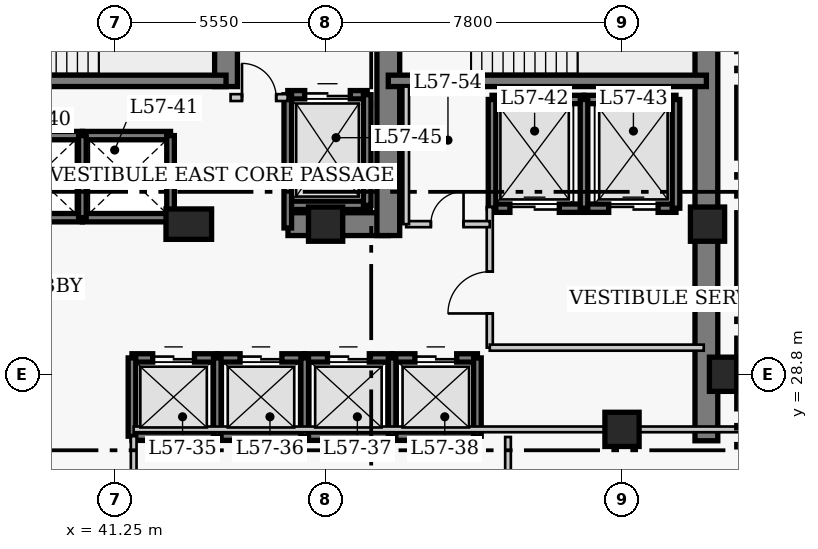
"""IFC4 building model, lengths in metres.
Left out: names, types, materials, properties, quantities, classifications, styles, units other than length and angle.
Written with IfcOpenShell. Run it as: python <this file> out.ifc"""

import sys

from ifc_helpers import new_model, si_unit, direction, frame, frame_2d, origin, origin_2d, place, context, subcontext, project, spatial, rectangle, extrude, element, fill, save


model = new_model("IFC4")
c1 = context("Model", 3, precision=1e-05, world=origin(), true_north=direction((0.0, 1.0)))
c2 = subcontext(c1, "Body", "Model", "MODEL_VIEW")
j1 = project(units=[si_unit("LENGTHUNIT", "METRE"), si_unit("PLANEANGLEUNIT", "RADIAN")], contexts=[c1])
p1 = place(None, origin())
s1 = spatial("IfcSite", under=j1, at=p1, CompositionType="ELEMENT")
p2 = place(p1, origin())
s2 = spatial("IfcBuilding", under=s1, at=p2, CompositionType="ELEMENT")
p3 = place(p2, frame((0.0, 0.0, 228.0)))
s3 = spatial("IfcBuildingStorey", under=s2, at=p3, CompositionType="ELEMENT", Elevation=228.0)
p4 = place(p3, frame((56.82, 27.05, 0.0), z_axis=(0.0, 0.0, 1.0), x_axis=(0.0, 1.0, 0.0)))
e1 = element("IfcWall", 1, at=p4, inside=s3, PredefinedType="SHEAR", context=c2, shape_type="SweptSolid", body=[
    extrude(rectangle(XDim=13.57, YDim=0.6, at=frame_2d((6.785, 0.0))), origin(), (0.0, 0.0, 1.0), 3.9),
])
p5 = place(p3, frame((45.81, 32.75, 0.0), z_axis=(0.0, 0.0, 1.0), x_axis=(1.0, 0.0, 0.0)))
e2 = element("IfcWall", 2, at=p5, inside=s3, PredefinedType="SHEAR", context=c2, shape_type="SweptSolid", body=[
    extrude(rectangle(XDim=2.64, YDim=0.6, at=frame_2d((1.32, 0.0))), origin(), (0.0, 0.0, 1.0), 3.9),
])
p6 = place(p3, frame((44.18, 36.37, 0.0), z_axis=(0.0, 0.0, 1.0), x_axis=(0.0, 1.0, 0.0)))
e3 = element("IfcWall", 3, at=p6, inside=s3, PredefinedType="SHEAR", context=c2, shape_type="SweptSolid", body=[
    extrude(rectangle(XDim=3.95, YDim=0.6, at=frame_2d((1.975, 0.0))), origin(), (0.0, 0.0, 1.0), 3.9),
])
p7 = place(p3, frame((48.45, 32.45, 0.0), z_axis=(0.0, 0.0, 1.0), x_axis=(0.0, 1.0, 0.0)))
e4 = element("IfcWall", 4, at=p7, inside=s3, PredefinedType="SHEAR", context=c2, shape_type="SweptSolid", body=[
    extrude(rectangle(XDim=7.87, YDim=0.6, at=frame_2d((3.935, 0.0))), origin(), (0.0, 0.0, 1.0), 3.9),
])
p8 = place(p7, frame((5.75, 0.0, 0.0)))
e5 = element("IfcOpeningElement", 5, at=p8, cuts=e4, PredefinedType="OPENING", context=c2, shape_type="SweptSolid", body=[
    extrude(rectangle(XDim=1.1, YDim=2.15, at=frame_2d((0.55, 1.075))), frame((0.0, 0.31, 0.0), z_axis=(0.0, -1.0, 0.0), x_axis=(1.0, 0.0, 0.0)), (0.0, 0.0, 1.0), 0.62),
])
p9 = place(p3, frame((35.85, 36.52, 0.0), z_axis=(0.0, 0.0, 1.0), x_axis=(1.0, 0.0, 0.0)))
e6 = element("IfcWall", 6, at=p9, inside=s3, PredefinedType="SHEAR", context=c2, shape_type="SweptSolid", body=[
    extrude(rectangle(XDim=8.33, YDim=0.3, at=frame_2d((4.165, 0.0))), origin(), (0.0, 0.0, 1.0), 3.9),
])
p10 = place(p3, frame((48.45, 36.52, 0.0), z_axis=(0.0, 0.0, 1.0), x_axis=(1.0, 0.0, 0.0)))
e7 = element("IfcWall", 7, at=p10, inside=s3, PredefinedType="SHEAR", context=c2, shape_type="SweptSolid", body=[
    extrude(rectangle(XDim=8.37, YDim=0.3, at=frame_2d((4.185, 0.0))), origin(), (0.0, 0.0, 1.0), 3.9),
])
p11 = place(p3, frame((57.35, 28.8, 0.0), z_axis=(0.0, 0.0, 1.0), x_axis=(1.0, 0.0, 0.0)))
e8 = element("IfcColumn", 8, at=p11, inside=s3, PredefinedType="COLUMN", context=c2, shape_type="SweptSolid", body=[
    extrude(rectangle(XDim=0.9, YDim=0.9, at=origin_2d()), origin(), (0.0, 0.0, 1.0), 3.9),
])
p12 = place(p3, frame((43.2, 32.75, 0.0), z_axis=(0.0, 0.0, 1.0), x_axis=(1.0, 0.0, 0.0)))
e9 = element("IfcColumn", 9, at=p12, inside=s3, PredefinedType="COLUMN", context=c2, shape_type="SweptSolid", body=[
    extrude(rectangle(XDim=1.2, YDim=0.8, at=origin_2d()), origin(), (0.0, 0.0, 1.0), 3.9),
])
for number, where, z_axis, x_axis in (
    (10, (46.8, 32.75, 0.0), (0.0, 0.0, 1.0), (1.0, 0.0, 0.0)),
    (11, (54.6, 27.35, 0.0), (0.0, 0.0, 1.0), (1.0, 0.0, 0.0)),
    (12, (56.85, 32.75, 0.0), (0.0, 0.0, 1.0), (1.0, 0.0, 0.0)),
):
    element("IfcColumn", number, at=place(p3, frame(where, z_axis=z_axis, x_axis=x_axis)), inside=s3, PredefinedType="COLUMN", context=c2, shape_type="SweptSolid", body=[
        extrude(rectangle(XDim=0.9, YDim=0.9, at=origin_2d()), origin(), (0.0, 0.0, 1.0), 3.9),
    ])
p13 = place(p3, frame((41.705, 29.23, 0.0), z_axis=(0.0, 0.0, 1.0), x_axis=(1.0, 0.0, 0.0)))
e13 = element("IfcWall", 13, at=p13, inside=s3, PredefinedType="SHEAR", context=c2, shape_type="SweptSolid", body=[
    extrude(rectangle(XDim=2.245, YDim=0.22, at=frame_2d((1.123, 0.0))), origin(), (0.0, 0.0, 1.0), 3.9),
])
p14 = place(p13, frame((0.545, 0.0, 0.0)))
e14 = element("IfcOpeningElement", 14, at=p14, cuts=e13, PredefinedType="OPENING", context=c2, shape_type="SweptSolid", body=[
    extrude(rectangle(XDim=1.1, YDim=2.15, at=frame_2d((0.55, 1.075))), frame((0.0, 0.12, 0.0), z_axis=(0.0, -1.0, 0.0), x_axis=(1.0, 0.0, 0.0)), (0.0, 0.0, 1.0), 0.24),
])
p15 = place(p3, frame((41.705, 27.17, 0.0), z_axis=(0.0, 0.0, 1.0), x_axis=(1.0, 0.0, 0.0)))
e15 = element("IfcWall", 15, at=p15, inside=s3, PredefinedType="SHEAR", context=c2, shape_type="SweptSolid", body=[
    extrude(rectangle(XDim=2.245, YDim=0.22, at=frame_2d((1.123, 0.0))), origin(), (0.0, 0.0, 1.0), 3.9),
])
p16 = place(p3, frame((41.705, 27.17, 0.0), z_axis=(0.0, 0.0, 1.0), x_axis=(0.0, 1.0, 0.0)))
e16 = element("IfcWall", 16, at=p16, inside=s3, PredefinedType="SHEAR", context=c2, shape_type="SweptSolid", body=[
    extrude(rectangle(XDim=2.06, YDim=0.2, at=frame_2d((1.03, 0.0))), origin(), (0.0, 0.0, 1.0), 3.9),
])
p17 = place(p3, frame((43.95, 29.23, 0.0), z_axis=(0.0, 0.0, 1.0), x_axis=(1.0, 0.0, 0.0)))
e17 = element("IfcWall", 17, at=p17, inside=s3, PredefinedType="SHEAR", context=c2, shape_type="SweptSolid", body=[
    extrude(rectangle(XDim=2.3, YDim=0.22, at=frame_2d((1.15, 0.0))), origin(), (0.0, 0.0, 1.0), 3.9),
])
p18 = place(p17, frame((0.6, 0.0, 0.0)))
e18 = element("IfcOpeningElement", 18, at=p18, cuts=e17, PredefinedType="OPENING", context=c2, shape_type="SweptSolid", body=[
    extrude(rectangle(XDim=1.1, YDim=2.15, at=frame_2d((0.55, 1.075))), frame((0.0, 0.12, 0.0), z_axis=(0.0, -1.0, 0.0), x_axis=(1.0, 0.0, 0.0)), (0.0, 0.0, 1.0), 0.24),
])
p19 = place(p3, frame((43.95, 27.17, 0.0), z_axis=(0.0, 0.0, 1.0), x_axis=(1.0, 0.0, 0.0)))
e19 = element("IfcWall", 19, at=p19, inside=s3, PredefinedType="SHEAR", context=c2, shape_type="SweptSolid", body=[
    extrude(rectangle(XDim=2.3, YDim=0.22, at=frame_2d((1.15, 0.0))), origin(), (0.0, 0.0, 1.0), 3.9),
])
p20 = place(p3, frame((43.95, 27.17, 0.0), z_axis=(0.0, 0.0, 1.0), x_axis=(0.0, 1.0, 0.0)))
e20 = element("IfcWall", 20, at=p20, inside=s3, PredefinedType="SHEAR", context=c2, shape_type="SweptSolid", body=[
    extrude(rectangle(XDim=2.06, YDim=0.2, at=frame_2d((1.03, 0.0))), origin(), (0.0, 0.0, 1.0), 3.9),
])
p21 = place(p3, frame((46.25, 29.23, 0.0), z_axis=(0.0, 0.0, 1.0), x_axis=(1.0, 0.0, 0.0)))
e21 = element("IfcWall", 21, at=p21, inside=s3, PredefinedType="SHEAR", context=c2, shape_type="SweptSolid", body=[
    extrude(rectangle(XDim=2.3, YDim=0.22, at=frame_2d((1.15, 0.0))), origin(), (0.0, 0.0, 1.0), 3.9),
])
p22 = place(p21, frame((0.6, 0.0, 0.0)))
e22 = element("IfcOpeningElement", 22, at=p22, cuts=e21, PredefinedType="OPENING", context=c2, shape_type="SweptSolid", body=[
    extrude(rectangle(XDim=1.1, YDim=2.15, at=frame_2d((0.55, 1.075))), frame((0.0, 0.12, 0.0), z_axis=(0.0, -1.0, 0.0), x_axis=(1.0, 0.0, 0.0)), (0.0, 0.0, 1.0), 0.24),
])
p23 = place(p3, frame((46.25, 27.17, 0.0), z_axis=(0.0, 0.0, 1.0), x_axis=(1.0, 0.0, 0.0)))
e23 = element("IfcWall", 23, at=p23, inside=s3, PredefinedType="SHEAR", context=c2, shape_type="SweptSolid", body=[
    extrude(rectangle(XDim=2.3, YDim=0.22, at=frame_2d((1.15, 0.0))), origin(), (0.0, 0.0, 1.0), 3.9),
])
p24 = place(p3, frame((46.25, 27.17, 0.0), z_axis=(0.0, 0.0, 1.0), x_axis=(0.0, 1.0, 0.0)))
e24 = element("IfcWall", 24, at=p24, inside=s3, PredefinedType="SHEAR", context=c2, shape_type="SweptSolid", body=[
    extrude(rectangle(XDim=2.06, YDim=0.2, at=frame_2d((1.03, 0.0))), origin(), (0.0, 0.0, 1.0), 3.9),
])
p25 = place(p3, frame((48.55, 29.23, 0.0), z_axis=(0.0, 0.0, 1.0), x_axis=(1.0, 0.0, 0.0)))
e25 = element("IfcWall", 25, at=p25, inside=s3, PredefinedType="SHEAR", context=c2, shape_type="SweptSolid", body=[
    extrude(rectangle(XDim=2.245, YDim=0.22, at=frame_2d((1.123, 0.0))), origin(), (0.0, 0.0, 1.0), 3.9),
])
p26 = place(p25, frame((0.6, 0.0, 0.0)))
e26 = element("IfcOpeningElement", 26, at=p26, cuts=e25, PredefinedType="OPENING", context=c2, shape_type="SweptSolid", body=[
    extrude(rectangle(XDim=1.1, YDim=2.15, at=frame_2d((0.55, 1.075))), frame((0.0, 0.12, 0.0), z_axis=(0.0, -1.0, 0.0), x_axis=(1.0, 0.0, 0.0)), (0.0, 0.0, 1.0), 0.24),
])
p27 = place(p3, frame((48.55, 27.17, 0.0), z_axis=(0.0, 0.0, 1.0), x_axis=(1.0, 0.0, 0.0)))
e27 = element("IfcWall", 27, at=p27, inside=s3, PredefinedType="SHEAR", context=c2, shape_type="SweptSolid", body=[
    extrude(rectangle(XDim=2.245, YDim=0.22, at=frame_2d((1.123, 0.0))), origin(), (0.0, 0.0, 1.0), 3.9),
])
for number, where, z_axis, x_axis in (
    (28, (48.55, 27.17, 0.0), (0.0, 0.0, 1.0), (0.0, 1.0, 0.0)),
    (29, (50.795, 27.17, 0.0), (0.0, 0.0, 1.0), (0.0, 1.0, 0.0)),
):
    element("IfcWall", number, at=place(p3, frame(where, z_axis=z_axis, x_axis=x_axis)), inside=s3, PredefinedType="SHEAR", context=c2, shape_type="SweptSolid", body=[
        extrude(rectangle(XDim=2.06, YDim=0.2, at=frame_2d((1.03, 0.0))), origin(), (0.0, 0.0, 1.0), 3.9),
    ])
for number, where, z_axis, x_axis in (
    (30, (38.0, 35.08, 0.0), (0.0, 0.0, 1.0), (1.0, 0.0, 0.0)),
    (31, (38.0, 32.92, 0.0), (0.0, 0.0, 1.0), (1.0, 0.0, 0.0)),
):
    element("IfcWall", number, at=place(p3, frame(where, z_axis=z_axis, x_axis=x_axis)), inside=s3, PredefinedType="SHEAR", context=c2, shape_type="SweptSolid", body=[
        extrude(rectangle(XDim=2.4, YDim=0.22, at=frame_2d((1.2, 0.0))), origin(), (0.0, 0.0, 1.0), 3.9),
    ])
for number, where, z_axis, x_axis in (
    (32, (40.4, 35.08, 0.0), (0.0, 0.0, 1.0), (1.0, 0.0, 0.0)),
    (33, (40.4, 32.92, 0.0), (0.0, 0.0, 1.0), (1.0, 0.0, 0.0)),
):
    element("IfcWall", number, at=place(p3, frame(where, z_axis=z_axis, x_axis=x_axis)), inside=s3, PredefinedType="SHEAR", context=c2, shape_type="SweptSolid", body=[
        extrude(rectangle(XDim=2.32, YDim=0.22, at=frame_2d((1.16, 0.0))), origin(), (0.0, 0.0, 1.0), 3.9),
    ])
for number, where, z_axis, x_axis in (
    (34, (40.4, 32.92, 0.0), (0.0, 0.0, 1.0), (0.0, 1.0, 0.0)),
    (35, (42.72, 32.92, 0.0), (0.0, 0.0, 1.0), (0.0, 1.0, 0.0)),
):
    element("IfcWall", number, at=place(p3, frame(where, z_axis=z_axis, x_axis=x_axis)), inside=s3, PredefinedType="SHEAR", context=c2, shape_type="SweptSolid", body=[
        extrude(rectangle(XDim=2.16, YDim=0.2, at=frame_2d((1.08, 0.0))), origin(), (0.0, 0.0, 1.0), 3.9),
    ])
p28 = place(p3, frame((51.18, 36.03, 0.0), z_axis=(0.0, 0.0, 1.0), x_axis=(1.0, 0.0, 0.0)))
e36 = element("IfcWall", 36, at=p28, inside=s3, PredefinedType="SHEAR", context=c2, shape_type="SweptSolid", body=[
    extrude(rectangle(XDim=2.42, YDim=0.22, at=frame_2d((1.21, 0.0))), origin(), (0.0, 0.0, 1.0), 3.9),
])
p29 = place(p3, frame((51.18, 33.17, 0.0), z_axis=(0.0, 0.0, 1.0), x_axis=(1.0, 0.0, 0.0)))
e37 = element("IfcWall", 37, at=p29, inside=s3, PredefinedType="SHEAR", context=c2, shape_type="SweptSolid", body=[
    extrude(rectangle(XDim=2.42, YDim=0.22, at=frame_2d((1.21, 0.0))), origin(), (0.0, 0.0, 1.0), 3.9),
])
p30 = place(p29, frame((0.47, 0.0, 0.0)))
e38 = element("IfcOpeningElement", 38, at=p30, cuts=e37, PredefinedType="OPENING", context=c2, shape_type="SweptSolid", body=[
    extrude(rectangle(XDim=1.3, YDim=2.15, at=frame_2d((0.65, 1.075))), frame((0.0, 0.12, 0.0), z_axis=(0.0, -1.0, 0.0), x_axis=(1.0, 0.0, 0.0)), (0.0, 0.0, 1.0), 0.24),
])
p31 = place(p3, frame((51.18, 33.17, 0.0), z_axis=(0.0, 0.0, 1.0), x_axis=(0.0, 1.0, 0.0)))
e39 = element("IfcWall", 39, at=p31, inside=s3, PredefinedType="SHEAR", context=c2, shape_type="SweptSolid", body=[
    extrude(rectangle(XDim=2.86, YDim=0.2, at=frame_2d((1.43, 0.0))), origin(), (0.0, 0.0, 1.0), 3.9),
])
p32 = place(p3, frame((53.6, 36.03, 0.0), z_axis=(0.0, 0.0, 1.0), x_axis=(1.0, 0.0, 0.0)))
e40 = element("IfcWall", 40, at=p32, inside=s3, PredefinedType="SHEAR", context=c2, shape_type="SweptSolid", body=[
    extrude(rectangle(XDim=2.42, YDim=0.22, at=frame_2d((1.21, 0.0))), origin(), (0.0, 0.0, 1.0), 3.9),
])
p33 = place(p3, frame((53.6, 33.17, 0.0), z_axis=(0.0, 0.0, 1.0), x_axis=(1.0, 0.0, 0.0)))
e41 = element("IfcWall", 41, at=p33, inside=s3, PredefinedType="SHEAR", context=c2, shape_type="SweptSolid", body=[
    extrude(rectangle(XDim=2.42, YDim=0.22, at=frame_2d((1.21, 0.0))), origin(), (0.0, 0.0, 1.0), 3.9),
])
p34 = place(p33, frame((0.65, 0.0, 0.0)))
e42 = element("IfcOpeningElement", 42, at=p34, cuts=e41, PredefinedType="OPENING", context=c2, shape_type="SweptSolid", body=[
    extrude(rectangle(XDim=1.3, YDim=2.15, at=frame_2d((0.65, 1.075))), frame((0.0, 0.12, 0.0), z_axis=(0.0, -1.0, 0.0), x_axis=(1.0, 0.0, 0.0)), (0.0, 0.0, 1.0), 0.24),
])
for number, where, z_axis, x_axis in (
    (43, (53.6, 33.17, 0.0), (0.0, 0.0, 1.0), (0.0, 1.0, 0.0)),
    (44, (56.02, 33.17, 0.0), (0.0, 0.0, 1.0), (0.0, 1.0, 0.0)),
):
    element("IfcWall", number, at=place(p3, frame(where, z_axis=z_axis, x_axis=x_axis)), inside=s3, PredefinedType="SHEAR", context=c2, shape_type="SweptSolid", body=[
        extrude(rectangle(XDim=2.86, YDim=0.2, at=frame_2d((1.43, 0.0))), origin(), (0.0, 0.0, 1.0), 3.9),
    ])
p35 = place(p3, frame((45.805, 36.155, 0.0), z_axis=(0.0, 0.0, 1.0), x_axis=(1.0, 0.0, 0.0)))
e45 = element("IfcWall", 45, at=p35, inside=s3, PredefinedType="SHEAR", context=c2, shape_type="SweptSolid", body=[
    extrude(rectangle(XDim=2.09, YDim=0.22, at=frame_2d((1.045, 0.0))), origin(), (0.0, 0.0, 1.0), 3.9),
])
p36 = place(p35, frame((0.445, 0.0, 0.0)))
e46 = element("IfcOpeningElement", 46, at=p36, cuts=e45, PredefinedType="OPENING", context=c2, shape_type="SweptSolid", body=[
    extrude(rectangle(XDim=1.2, YDim=2.15, at=frame_2d((0.6, 1.075))), frame((0.0, 0.12, 0.0), z_axis=(0.0, -1.0, 0.0), x_axis=(1.0, 0.0, 0.0)), (0.0, 0.0, 1.0), 0.24),
])
p37 = place(p3, frame((45.805, 33.245, 0.0), z_axis=(0.0, 0.0, 1.0), x_axis=(1.0, 0.0, 0.0)))
e47 = element("IfcWall", 47, at=p37, inside=s3, PredefinedType="SHEAR", context=c2, shape_type="SweptSolid", body=[
    extrude(rectangle(XDim=2.09, YDim=0.22, at=frame_2d((1.045, 0.0))), origin(), (0.0, 0.0, 1.0), 3.9),
])
p38 = place(p3, frame((45.805, 32.65, 0.0), z_axis=(0.0, 0.0, 1.0), x_axis=(0.0, 1.0, 0.0)))
e48 = element("IfcWall", 48, at=p38, inside=s3, PredefinedType="SHEAR", context=c2, shape_type="SweptSolid", body=[
    extrude(rectangle(XDim=3.505, YDim=0.2, at=frame_2d((1.752, 0.0))), origin(), (0.0, 0.0, 1.0), 3.9),
])
p39 = place(p3, frame((47.895, 33.245, 0.0), z_axis=(0.0, 0.0, 1.0), x_axis=(0.0, 1.0, 0.0)))
e49 = element("IfcWall", 49, at=p39, inside=s3, PredefinedType="SHEAR", context=c2, shape_type="SweptSolid", body=[
    extrude(rectangle(XDim=2.91, YDim=0.2, at=frame_2d((1.455, 0.0))), origin(), (0.0, 0.0, 1.0), 3.9),
])
p40 = place(p3, frame((44.3, 36.08, 0.0), z_axis=(0.0, 0.0, 1.0), x_axis=(1.0, 0.0, 0.0)))
e50 = element("IfcWall", 50, at=p40, inside=s3, PredefinedType="PARTITIONING", context=c2, shape_type="SweptSolid", body=[
    extrude(rectangle(XDim=1.5, YDim=0.18, at=frame_2d((0.75, 0.0))), origin(), (0.0, 0.0, 1.0), 3.56),
])
p41 = place(p40, frame((0.3, 0.0, 0.0)))
e51 = element("IfcOpeningElement", 51, at=p41, cuts=e50, PredefinedType="OPENING", context=c2, shape_type="SweptSolid", body=[
    extrude(rectangle(XDim=0.9, YDim=2.15, at=frame_2d((0.45, 1.075))), frame((0.0, 0.1, 0.0), z_axis=(0.0, -1.0, 0.0), x_axis=(1.0, 0.0, 0.0)), (0.0, 0.0, 1.0), 0.2),
])
p42 = place(p3, frame((51.12, 29.5, 0.0), z_axis=(0.0, 0.0, 1.0), x_axis=(0.0, 1.0, 0.0)))
e52 = element("IfcWall", 52, at=p42, inside=s3, PredefinedType="PARTITIONING", context=c2, shape_type="SweptSolid", body=[
    extrude(rectangle(XDim=3.7, YDim=0.16, at=frame_2d((1.85, 0.0))), origin(), (0.0, 0.0, 1.0), 3.56),
])
p43 = place(p42, frame((0.9, 0.0, 0.0)))
e53 = element("IfcOpeningElement", 53, at=p43, cuts=e52, PredefinedType="OPENING", context=c2, shape_type="SweptSolid", body=[
    extrude(rectangle(XDim=1.1, YDim=2.15, at=frame_2d((0.55, 1.075))), frame((0.0, 0.09, 0.0), z_axis=(0.0, -1.0, 0.0), x_axis=(1.0, 0.0, 0.0)), (0.0, 0.0, 1.0), 0.18),
])
p44 = place(p3, frame((51.12, 29.5, 0.0), z_axis=(0.0, 0.0, 1.0), x_axis=(1.0, 0.0, 0.0)))
e54 = element("IfcWall", 54, at=p44, inside=s3, PredefinedType="PARTITIONING", context=c2, shape_type="SweptSolid", body=[
    extrude(rectangle(XDim=5.63, YDim=0.16, at=frame_2d((2.815, 0.0))), origin(), (0.0, 0.0, 1.0), 3.56),
])
p45 = place(p3, frame((48.92, 32.75, 0.0), z_axis=(0.0, 0.0, 1.0), x_axis=(1.0, 0.0, 0.0)))
e55 = element("IfcWall", 55, at=p45, inside=s3, PredefinedType="PARTITIONING", context=c2, shape_type="SweptSolid", body=[
    extrude(rectangle(XDim=2.2, YDim=0.16, at=frame_2d((1.1, 0.0))), origin(), (0.0, 0.0, 1.0), 3.56),
])
p46 = place(p45, frame((0.65, 0.0, 0.0)))
e56 = element("IfcOpeningElement", 56, at=p46, cuts=e55, PredefinedType="OPENING", context=c2, shape_type="SweptSolid", body=[
    extrude(rectangle(XDim=0.86, YDim=2.05, at=frame_2d((0.43, 1.025))), frame((0.0, 0.09, 0.0), z_axis=(0.0, -1.0, 0.0), x_axis=(1.0, 0.0, 0.0)), (0.0, 0.0, 1.0), 0.18),
])
p47 = place(p3, frame((48.92, 32.75, 0.0), z_axis=(0.0, 0.0, 1.0), x_axis=(0.0, 1.0, 0.0)))
e57 = element("IfcWall", 57, at=p47, inside=s3, PredefinedType="PARTITIONING", context=c2, shape_type="SweptSolid", body=[
    extrude(rectangle(XDim=3.62, YDim=0.15, at=frame_2d((1.81, 0.0))), origin(), (0.0, 0.0, 1.0), 3.56),
])
p48 = place(p3, frame((41.75, 17.66, 0.0), z_axis=(0.0, 0.0, 1.0), x_axis=(0.0, 1.0, 0.0)))
e58 = element("IfcWall", 58, at=p48, inside=s3, PredefinedType="PARTITIONING", context=c2, shape_type="SweptSolid", body=[
    extrude(rectangle(XDim=9.51, YDim=0.15, at=frame_2d((4.755, 0.0))), origin(), (0.0, 0.0, 1.0), 3.56),
])
p49 = place(p3, frame((51.6, 17.66, 0.0), z_axis=(0.0, 0.0, 1.0), x_axis=(0.0, 1.0, 0.0)))
e59 = element("IfcWall", 59, at=p49, inside=s3, PredefinedType="PARTITIONING", context=c2, shape_type="SweptSolid", body=[
    extrude(rectangle(XDim=9.49, YDim=0.15, at=frame_2d((4.745, 0.0))), origin(), (0.0, 0.0, 1.0), 3.56),
])
p50 = place(p3, frame((41.75, 27.35, 0.0), z_axis=(0.0, 0.0, 1.0), x_axis=(1.0, 0.0, 0.0)))
e60 = element("IfcWall", 60, at=p50, inside=s3, PredefinedType="PARTITIONING", context=c2, shape_type="SweptSolid", body=[
    extrude(rectangle(XDim=17.49, YDim=0.15, at=frame_2d((8.745, 0.0))), origin(), (0.0, 0.0, 1.0), 3.56),
])
p51 = place(p14, origin())
e61 = element("IfcDoor", 61, at=p51, inside=s3, OperationType="DOUBLE_DOOR_SLIDING", PredefinedType="DOOR", context=c2, shape_type="SweptSolid", body=[
    extrude(rectangle(XDim=1.1, YDim=2.15, at=frame_2d((0.55, 1.075))), frame((0.0, 0.025, 0.0), z_axis=(0.0, -1.0, 0.0), x_axis=(1.0, 0.0, 0.0)), (0.0, 0.0, 1.0), 0.05),
])
fill(e14, e61)
p52 = place(p18, origin())
e62 = element("IfcDoor", 62, at=p52, inside=s3, OperationType="DOUBLE_DOOR_SLIDING", PredefinedType="DOOR", context=c2, shape_type="SweptSolid", body=[
    extrude(rectangle(XDim=1.1, YDim=2.15, at=frame_2d((0.55, 1.075))), frame((0.0, 0.025, 0.0), z_axis=(0.0, -1.0, 0.0), x_axis=(1.0, 0.0, 0.0)), (0.0, 0.0, 1.0), 0.05),
])
fill(e18, e62)
p53 = place(p22, origin())
e63 = element("IfcDoor", 63, at=p53, inside=s3, OperationType="DOUBLE_DOOR_SLIDING", PredefinedType="DOOR", context=c2, shape_type="SweptSolid", body=[
    extrude(rectangle(XDim=1.1, YDim=2.15, at=frame_2d((0.55, 1.075))), frame((0.0, 0.025, 0.0), z_axis=(0.0, -1.0, 0.0), x_axis=(1.0, 0.0, 0.0)), (0.0, 0.0, 1.0), 0.05),
])
fill(e22, e63)
p54 = place(p26, origin())
e64 = element("IfcDoor", 64, at=p54, inside=s3, OperationType="DOUBLE_DOOR_SLIDING", PredefinedType="DOOR", context=c2, shape_type="SweptSolid", body=[
    extrude(rectangle(XDim=1.1, YDim=2.15, at=frame_2d((0.55, 1.075))), frame((0.0, 0.025, 0.0), z_axis=(0.0, -1.0, 0.0), x_axis=(1.0, 0.0, 0.0)), (0.0, 0.0, 1.0), 0.05),
])
fill(e26, e64)
p55 = place(p30, origin())
e65 = element("IfcDoor", 65, at=p55, inside=s3, OperationType="DOUBLE_DOOR_SLIDING", PredefinedType="DOOR", context=c2, shape_type="SweptSolid", body=[
    extrude(rectangle(XDim=1.3, YDim=2.15, at=frame_2d((0.65, 1.075))), frame((0.0, 0.025, 0.0), z_axis=(0.0, -1.0, 0.0), x_axis=(1.0, 0.0, 0.0)), (0.0, 0.0, 1.0), 0.05),
])
fill(e38, e65)
p56 = place(p34, origin())
e66 = element("IfcDoor", 66, at=p56, inside=s3, OperationType="DOUBLE_DOOR_SLIDING", PredefinedType="DOOR", context=c2, shape_type="SweptSolid", body=[
    extrude(rectangle(XDim=1.3, YDim=2.15, at=frame_2d((0.65, 1.075))), frame((0.0, 0.025, 0.0), z_axis=(0.0, -1.0, 0.0), x_axis=(1.0, 0.0, 0.0)), (0.0, 0.0, 1.0), 0.05),
])
fill(e42, e66)
p57 = place(p36, origin())
e67 = element("IfcDoor", 67, at=p57, inside=s3, OperationType="DOUBLE_DOOR_SLIDING", PredefinedType="DOOR", context=c2, shape_type="SweptSolid", body=[
    extrude(rectangle(XDim=1.2, YDim=2.15, at=frame_2d((0.6, 1.075))), frame((0.0, 0.025, 0.0), z_axis=(0.0, -1.0, 0.0), x_axis=(1.0, 0.0, 0.0)), (0.0, 0.0, 1.0), 0.05),
])
fill(e46, e67)
p58 = place(p41, origin())
e68 = element("IfcDoor", 68, at=p58, inside=s3, OperationType="SINGLE_SWING_LEFT", PredefinedType="DOOR", context=c2, shape_type="SweptSolid", body=[
    extrude(rectangle(XDim=0.9, YDim=2.15, at=frame_2d((0.45, 1.075))), frame((0.0, 0.025, 0.0), z_axis=(0.0, -1.0, 0.0), x_axis=(1.0, 0.0, 0.0)), (0.0, 0.0, 1.0), 0.05),
])
fill(e51, e68)
p59 = place(p43, origin())
e69 = element("IfcDoor", 69, at=p59, inside=s3, OperationType="SINGLE_SWING_LEFT", PredefinedType="DOOR", context=c2, shape_type="SweptSolid", body=[
    extrude(rectangle(XDim=1.1, YDim=2.15, at=frame_2d((0.55, 1.075))), frame((0.0, 0.025, 0.0), z_axis=(0.0, -1.0, 0.0), x_axis=(1.0, 0.0, 0.0)), (0.0, 0.0, 1.0), 0.05),
])
fill(e53, e69)
p60 = place(p46, origin())
e70 = element("IfcDoor", 70, at=p60, inside=s3, OperationType="SINGLE_SWING_RIGHT", PredefinedType="DOOR", context=c2, shape_type="SweptSolid", body=[
    extrude(rectangle(XDim=0.86, YDim=2.05, at=frame_2d((0.43, 1.025))), frame((0.0, 0.025, 0.0), z_axis=(0.0, -1.0, 0.0), x_axis=(1.0, 0.0, 0.0)), (0.0, 0.0, 1.0), 0.05),
])
fill(e56, e70)
save(model, sys.argv[1])
